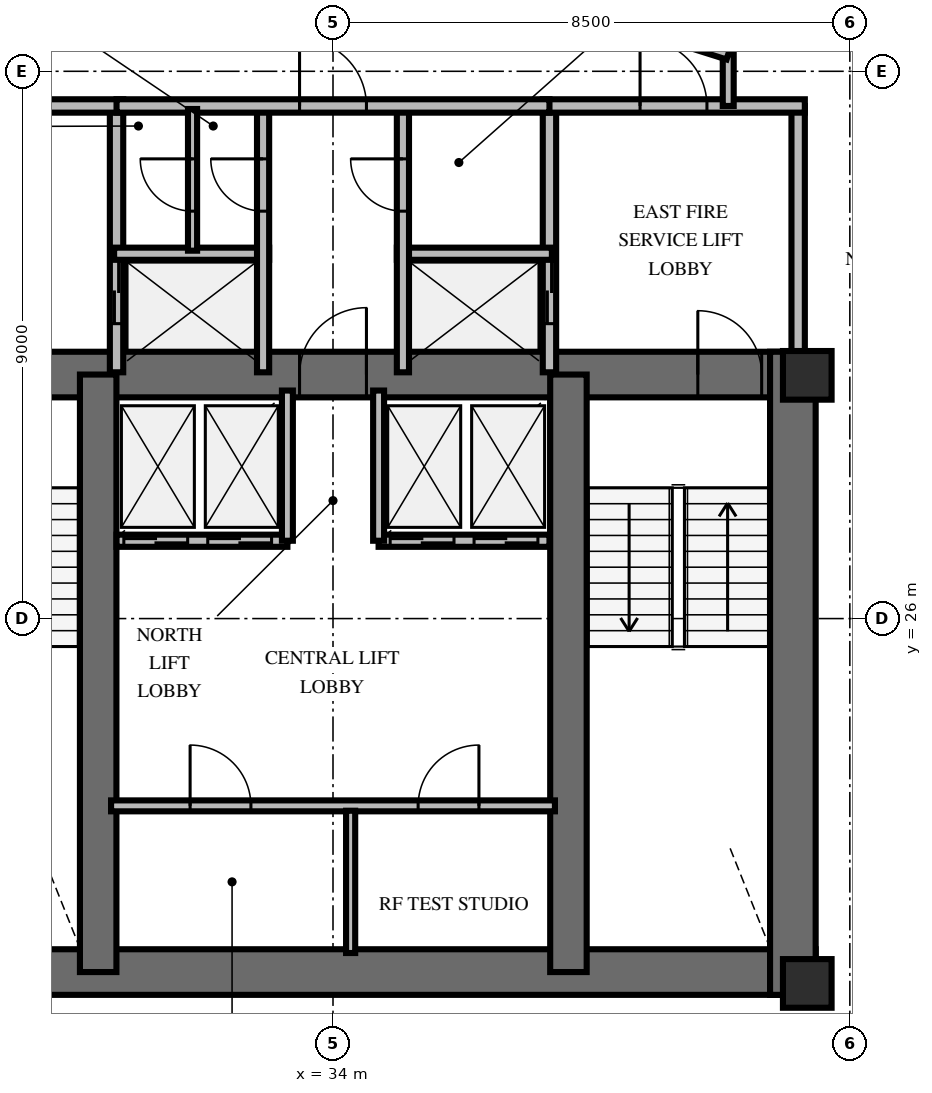
"""IFC4 building model, lengths in metres.
Left out: names, types, materials, properties, quantities, classifications, styles, units other than length and angle.
Written with IfcOpenShell. Run it as: python <this file> out.ifc"""

import sys

from ifc_helpers import new_model, si_unit, direction, frame, frame_2d, origin, origin_2d, place, context, subcontext, project, spatial, rectangle, extrude, element, fill, save


model = new_model("IFC4")
c1 = context("Model", 3, precision=1e-05, world=origin(), true_north=direction((0.0, 1.0)))
c2 = subcontext(c1, "Body", "Model", "MODEL_VIEW")
j1 = project(units=[si_unit("LENGTHUNIT", "METRE"), si_unit("PLANEANGLEUNIT", "RADIAN")], contexts=[c1])
p1 = place(None, origin())
s1 = spatial("IfcSite", under=j1, at=p1, CompositionType="ELEMENT")
p2 = place(p1, origin())
s2 = spatial("IfcBuilding", under=s1, at=p2, CompositionType="ELEMENT")
p3 = place(p2, frame((0.0, 0.0, 213.2)))
s3 = spatial("IfcBuildingStorey", under=s2, at=p3, CompositionType="ELEMENT", Elevation=213.2)
p4 = place(p3, frame((26.072, 20.187, 0.0), z_axis=(0.0, 0.0, 1.0), x_axis=(1.0, 0.0, 0.0)))
e1 = element("IfcWall", 1, at=p4, inside=s3, PredefinedType="SHEAR", context=c2, shape_type="SweptSolid", body=[
    extrude(rectangle(XDim=15.866, YDim=0.75, at=frame_2d((7.933, 0.0))), origin(), (0.0, 0.0, 1.0), 3.6),
])
p5 = place(p3, frame((26.072, 30.013, 0.0), z_axis=(0.0, 0.0, 1.0), x_axis=(1.0, 0.0, 0.0)))
e2 = element("IfcWall", 2, at=p5, inside=s3, PredefinedType="SHEAR", context=c2, shape_type="SweptSolid", body=[
    extrude(rectangle(XDim=15.866, YDim=0.75, at=frame_2d((7.933, 0.0))), origin(), (0.0, 0.0, 1.0), 3.6),
])
p6 = place(p5, frame((0.878, 0.0, 0.0)))
e3 = element("IfcOpeningElement", 3, at=p6, cuts=e2, PredefinedType="OPENING", context=c2, shape_type="SweptSolid", body=[
    extrude(rectangle(XDim=1.05, YDim=2.15, at=frame_2d((0.525, 1.075))), frame((0.0, 0.385, 0.0), z_axis=(0.0, -1.0, 0.0), x_axis=(1.0, 0.0, 0.0)), (0.0, 0.0, 1.0), 0.77),
])
p7 = place(p5, frame((13.928, 0.0, 0.0)))
e4 = element("IfcOpeningElement", 4, at=p7, cuts=e2, PredefinedType="OPENING", context=c2, shape_type="SweptSolid", body=[
    extrude(rectangle(XDim=1.05, YDim=2.15, at=frame_2d((0.525, 1.075))), frame((0.0, 0.385, 0.0), z_axis=(0.0, -1.0, 0.0), x_axis=(1.0, 0.0, 0.0)), (0.0, 0.0, 1.0), 0.77),
])
p8 = place(p5, frame((7.378, 0.0, 0.0)))
e5 = element("IfcOpeningElement", 5, at=p8, cuts=e2, PredefinedType="OPENING", context=c2, shape_type="SweptSolid", body=[
    extrude(rectangle(XDim=1.1, YDim=2.15, at=frame_2d((0.55, 1.075))), frame((0.0, 0.385, 0.0), z_axis=(0.0, -1.0, 0.0), x_axis=(1.0, 0.0, 0.0)), (0.0, 0.0, 1.0), 0.77),
])
p9 = place(p3, frame((41.563, 19.812, 0.0), z_axis=(0.0, 0.0, 1.0), x_axis=(0.0, 1.0, 0.0)))
e6 = element("IfcWall", 6, at=p9, inside=s3, PredefinedType="SHEAR", context=c2, shape_type="SweptSolid", body=[
    extrude(rectangle(XDim=10.576, YDim=0.75, at=frame_2d((5.288, 0.0))), origin(), (0.0, 0.0, 1.0), 3.6),
])
for number, where, z_axis, x_axis in (
    (7, (30.138, 20.187, 0.0), (0.0, 0.0, 1.0), (0.0, 1.0, 0.0)),
    (8, (37.872, 20.187, 0.0), (0.0, 0.0, 1.0), (0.0, 1.0, 0.0)),
):
    element("IfcWall", number, at=place(p3, frame(where, z_axis=z_axis, x_axis=x_axis)), inside=s3, PredefinedType="SHEAR", context=c2, shape_type="SweptSolid", body=[
        extrude(rectangle(XDim=9.826, YDim=0.6, at=frame_2d((4.913, 0.0))), origin(), (0.0, 0.0, 1.0), 3.6),
    ])
for number, where, z_axis, x_axis in (
    (9, (41.8, 20.0, 0.0), (0.0, 0.0, 1.0), (1.0, 0.0, 0.0)),
    (10, (41.8, 30.0, 0.0), (0.0, 0.0, 1.0), (1.0, 0.0, 0.0)),
):
    element("IfcColumn", number, at=place(p3, frame(where, z_axis=z_axis, x_axis=x_axis)), inside=s3, PredefinedType="PILASTER", context=c2, shape_type="SweptSolid", body=[
        extrude(rectangle(XDim=0.8, YDim=0.8, at=origin_2d()), origin(), (0.0, 0.0, 1.0), 3.6),
    ])
p10 = place(p3, frame((30.44, 30.05, 0.0), z_axis=(0.0, 0.0, 1.0), x_axis=(0.0, 1.0, 0.0)))
e11 = element("IfcWall", 11, at=p10, inside=s3, PredefinedType="SOLIDWALL", context=c2, shape_type="SweptSolid", body=[
    extrude(rectangle(XDim=4.38, YDim=0.22, at=frame_2d((2.19, 0.0))), origin(), (0.0, 0.0, 1.0), 2.46),
])
p11 = place(p10, frame((0.8, 0.0, 0.0)))
e12 = element("IfcOpeningElement", 12, at=p11, cuts=e11, PredefinedType="OPENING", context=c2, shape_type="SweptSolid", body=[
    extrude(rectangle(XDim=1.05, YDim=2.1, at=frame_2d((0.525, 1.05))), frame((0.0, 0.12, 0.0), z_axis=(0.0, -1.0, 0.0), x_axis=(1.0, 0.0, 0.0)), (0.0, 0.0, 1.0), 0.24),
])
p12 = place(p3, frame((26.24, 34.43, 0.0), z_axis=(0.0, 0.0, 1.0), x_axis=(1.0, 0.0, 0.0)))
e13 = element("IfcWall", 13, at=p12, inside=s3, PredefinedType="SOLIDWALL", context=c2, shape_type="SweptSolid", body=[
    extrude(rectangle(XDim=4.31, YDim=0.22, at=frame_2d((2.155, 0.0))), origin(), (0.0, 0.0, 1.0), 2.46),
])
p13 = place(p12, frame((1.6, 0.0, 0.0)))
e14 = element("IfcOpeningElement", 14, at=p13, cuts=e13, PredefinedType="OPENING", context=c2, shape_type="SweptSolid", body=[
    extrude(rectangle(XDim=1.1, YDim=2.15, at=frame_2d((0.55, 1.075))), frame((0.0, 0.12, 0.0), z_axis=(0.0, -1.0, 0.0), x_axis=(1.0, 0.0, 0.0)), (0.0, 0.0, 1.0), 0.24),
])
p14 = place(p3, frame((30.4, 32.0, 0.0), z_axis=(0.0, 0.0, 1.0), x_axis=(1.0, 0.0, 0.0)))
e15 = element("IfcWall", 15, at=p14, inside=s3, PredefinedType="SOLIDWALL", context=c2, shape_type="SweptSolid", body=[
    extrude(rectangle(XDim=2.55, YDim=0.2, at=frame_2d((1.275, 0.0))), origin(), (0.0, 0.0, 1.0), 2.46),
])
p15 = place(p3, frame((32.85, 30.05, 0.0), z_axis=(0.0, 0.0, 1.0), x_axis=(0.0, 1.0, 0.0)))
e16 = element("IfcWall", 16, at=p15, inside=s3, PredefinedType="SOLIDWALL", context=c2, shape_type="SweptSolid", body=[
    extrude(rectangle(XDim=4.38, YDim=0.2, at=frame_2d((2.19, 0.0))), origin(), (0.0, 0.0, 1.0), 2.46),
])
p16 = place(p15, frame((2.65, 0.0, 0.0)))
e17 = element("IfcOpeningElement", 17, at=p16, cuts=e16, PredefinedType="OPENING", context=c2, shape_type="SweptSolid", body=[
    extrude(rectangle(XDim=0.86, YDim=2.05, at=frame_2d((0.43, 1.025))), frame((0.0, 0.11, 0.0), z_axis=(0.0, -1.0, 0.0), x_axis=(1.0, 0.0, 0.0)), (0.0, 0.0, 1.0), 0.22),
])
p17 = place(p3, frame((37.56, 30.05, 0.0), z_axis=(0.0, 0.0, 1.0), x_axis=(0.0, 1.0, 0.0)))
e18 = element("IfcWall", 18, at=p17, inside=s3, PredefinedType="SOLIDWALL", context=c2, shape_type="SweptSolid", body=[
    extrude(rectangle(XDim=4.38, YDim=0.22, at=frame_2d((2.19, 0.0))), origin(), (0.0, 0.0, 1.0), 2.46),
])
p18 = place(p17, frame((0.8, 0.0, 0.0)))
e19 = element("IfcOpeningElement", 19, at=p18, cuts=e18, PredefinedType="OPENING", context=c2, shape_type="SweptSolid", body=[
    extrude(rectangle(XDim=1.05, YDim=2.1, at=frame_2d((0.525, 1.05))), frame((0.0, 0.12, 0.0), z_axis=(0.0, -1.0, 0.0), x_axis=(1.0, 0.0, 0.0)), (0.0, 0.0, 1.0), 0.24),
])
p19 = place(p3, frame((41.65, 30.05, 0.0), z_axis=(0.0, 0.0, 1.0), x_axis=(0.0, 1.0, 0.0)))
e20 = element("IfcWall", 20, at=p19, inside=s3, PredefinedType="SOLIDWALL", context=c2, shape_type="SweptSolid", body=[
    extrude(rectangle(XDim=4.38, YDim=0.22, at=frame_2d((2.19, 0.0))), origin(), (0.0, 0.0, 1.0), 2.46),
])
p20 = place(p3, frame((37.45, 34.43, 0.0), z_axis=(0.0, 0.0, 1.0), x_axis=(1.0, 0.0, 0.0)))
e21 = element("IfcWall", 21, at=p20, inside=s3, PredefinedType="SOLIDWALL", context=c2, shape_type="SweptSolid", body=[
    extrude(rectangle(XDim=4.31, YDim=0.22, at=frame_2d((2.155, 0.0))), origin(), (0.0, 0.0, 1.0), 2.46),
])
p21 = place(p20, frame((1.6, 0.0, 0.0)))
e22 = element("IfcOpeningElement", 22, at=p21, cuts=e21, PredefinedType="OPENING", context=c2, shape_type="SweptSolid", body=[
    extrude(rectangle(XDim=1.1, YDim=2.15, at=frame_2d((0.55, 1.075))), frame((0.0, 0.12, 0.0), z_axis=(0.0, -1.0, 0.0), x_axis=(1.0, 0.0, 0.0)), (0.0, 0.0, 1.0), 0.24),
])
p22 = place(p3, frame((35.05, 32.0, 0.0), z_axis=(0.0, 0.0, 1.0), x_axis=(1.0, 0.0, 0.0)))
e23 = element("IfcWall", 23, at=p22, inside=s3, PredefinedType="SOLIDWALL", context=c2, shape_type="SweptSolid", body=[
    extrude(rectangle(XDim=2.55, YDim=0.2, at=frame_2d((1.275, 0.0))), origin(), (0.0, 0.0, 1.0), 2.46),
])
p23 = place(p3, frame((35.15, 30.05, 0.0), z_axis=(0.0, 0.0, 1.0), x_axis=(0.0, 1.0, 0.0)))
e24 = element("IfcWall", 24, at=p23, inside=s3, PredefinedType="SOLIDWALL", context=c2, shape_type="SweptSolid", body=[
    extrude(rectangle(XDim=4.38, YDim=0.2, at=frame_2d((2.19, 0.0))), origin(), (0.0, 0.0, 1.0), 2.46),
])
p24 = place(p23, frame((2.65, 0.0, 0.0)))
e25 = element("IfcOpeningElement", 25, at=p24, cuts=e24, PredefinedType="OPENING", context=c2, shape_type="SweptSolid", body=[
    extrude(rectangle(XDim=0.86, YDim=2.05, at=frame_2d((0.43, 1.025))), frame((0.0, 0.11, 0.0), z_axis=(0.0, -1.0, 0.0), x_axis=(1.0, 0.0, 0.0)), (0.0, 0.0, 1.0), 0.22),
])
p25 = place(p3, frame((30.44, 34.43, 0.0), z_axis=(0.0, 0.0, 1.0), x_axis=(1.0, 0.0, 0.0)))
e26 = element("IfcWall", 26, at=p25, inside=s3, PredefinedType="SOLIDWALL", context=c2, shape_type="SweptSolid", body=[
    extrude(rectangle(XDim=7.12, YDim=0.22, at=frame_2d((3.56, 0.0))), origin(), (0.0, 0.0, 1.0), 2.46),
])
p26 = place(p25, frame((3.01, 0.0, 0.0)))
e27 = element("IfcOpeningElement", 27, at=p26, cuts=e26, PredefinedType="OPENING", context=c2, shape_type="SweptSolid", body=[
    extrude(rectangle(XDim=1.1, YDim=2.15, at=frame_2d((0.55, 1.075))), frame((0.0, 0.12, 0.0), z_axis=(0.0, -1.0, 0.0), x_axis=(1.0, 0.0, 0.0)), (0.0, 0.0, 1.0), 0.24),
])
p27 = place(p3, frame((31.69, 32.05, 0.0), z_axis=(0.0, 0.0, 1.0), x_axis=(0.0, 1.0, 0.0)))
e28 = element("IfcWall", 28, at=p27, inside=s3, PredefinedType="PARTITIONING", context=c2, shape_type="SweptSolid", body=[
    extrude(rectangle(XDim=2.33, YDim=0.15, at=frame_2d((1.165, 0.0))), origin(), (0.0, 0.0, 1.0), 2.46),
])
p28 = place(p27, frame((0.65, 0.0, 0.0)))
e29 = element("IfcOpeningElement", 29, at=p28, cuts=e28, PredefinedType="OPENING", context=c2, shape_type="SweptSolid", body=[
    extrude(rectangle(XDim=0.86, YDim=2.05, at=frame_2d((0.43, 1.025))), frame((0.0, 0.085, 0.0), z_axis=(0.0, -1.0, 0.0), x_axis=(1.0, 0.0, 0.0)), (0.0, 0.0, 1.0), 0.17),
])
p29 = place(p3, frame((30.35, 22.92, 0.0), z_axis=(0.0, 0.0, 1.0), x_axis=(1.0, 0.0, 0.0)))
e30 = element("IfcWall", 30, at=p29, inside=s3, PredefinedType="PARTITIONING", context=c2, shape_type="SweptSolid", body=[
    extrude(rectangle(XDim=7.3, YDim=0.18, at=frame_2d((3.65, 0.0))), origin(), (0.0, 0.0, 1.0), 2.46),
])
p30 = place(p29, frame((1.3, 0.0, 0.0)))
e31 = element("IfcOpeningElement", 31, at=p30, cuts=e30, PredefinedType="OPENING", context=c2, shape_type="SweptSolid", body=[
    extrude(rectangle(XDim=1.0, YDim=2.15, at=frame_2d((0.5, 1.075))), frame((0.0, 0.1, 0.0), z_axis=(0.0, -1.0, 0.0), x_axis=(1.0, 0.0, 0.0)), (0.0, 0.0, 1.0), 0.2),
])
p31 = place(p29, frame((5.05, 0.0, 0.0)))
e32 = element("IfcOpeningElement", 32, at=p31, cuts=e30, PredefinedType="OPENING", context=c2, shape_type="SweptSolid", body=[
    extrude(rectangle(XDim=1.0, YDim=2.15, at=frame_2d((0.5, 1.075))), frame((0.0, 0.1, 0.0), z_axis=(0.0, -1.0, 0.0), x_axis=(1.0, 0.0, 0.0)), (0.0, 0.0, 1.0), 0.2),
])
p32 = place(p3, frame((34.29, 20.5, 0.0), z_axis=(0.0, 0.0, 1.0), x_axis=(0.0, 1.0, 0.0)))
e33 = element("IfcWall", 33, at=p32, inside=s3, PredefinedType="PARTITIONING", context=c2, shape_type="SweptSolid", body=[
    extrude(rectangle(XDim=2.34, YDim=0.15, at=frame_2d((1.17, 0.0))), origin(), (0.0, 0.0, 1.0), 2.46),
])
p33 = place(p3, frame((30.44, 27.28, 0.0), z_axis=(0.0, 0.0, 1.0), x_axis=(1.0, 0.0, 0.0)))
e34 = element("IfcWall", 34, at=p33, inside=s3, PredefinedType="SOLIDWALL", context=c2, shape_type="SweptSolid", body=[
    extrude(rectangle(XDim=2.81, YDim=0.2, at=frame_2d((1.405, 0.0))), origin(), (0.0, 0.0, 1.0), 2.46),
])
p34 = place(p33, frame((0.12, 0.0, 0.0)))
e35 = element("IfcOpeningElement", 35, at=p34, cuts=e34, PredefinedType="OPENING", context=c2, shape_type="SweptSolid", body=[
    extrude(rectangle(XDim=1.05, YDim=2.1, at=frame_2d((0.525, 1.05))), frame((0.0, 0.11, 0.0), z_axis=(0.0, -1.0, 0.0), x_axis=(1.0, 0.0, 0.0)), (0.0, 0.0, 1.0), 0.22),
])
p35 = place(p33, frame((1.5, 0.0, 0.0)))
e36 = element("IfcOpeningElement", 36, at=p35, cuts=e34, PredefinedType="OPENING", context=c2, shape_type="SweptSolid", body=[
    extrude(rectangle(XDim=1.05, YDim=2.1, at=frame_2d((0.525, 1.05))), frame((0.0, 0.11, 0.0), z_axis=(0.0, -1.0, 0.0), x_axis=(1.0, 0.0, 0.0)), (0.0, 0.0, 1.0), 0.22),
])
p36 = place(p3, frame((33.25, 27.28, 0.0), z_axis=(0.0, 0.0, 1.0), x_axis=(0.0, 1.0, 0.0)))
e37 = element("IfcWall", 37, at=p36, inside=s3, PredefinedType="SOLIDWALL", context=c2, shape_type="SweptSolid", body=[
    extrude(rectangle(XDim=2.47, YDim=0.18, at=frame_2d((1.235, 0.0))), origin(), (0.0, 0.0, 1.0), 2.46),
])
p37 = place(p3, frame((34.75, 27.28, 0.0), z_axis=(0.0, 0.0, 1.0), x_axis=(1.0, 0.0, 0.0)))
e38 = element("IfcWall", 38, at=p37, inside=s3, PredefinedType="SOLIDWALL", context=c2, shape_type="SweptSolid", body=[
    extrude(rectangle(XDim=2.81, YDim=0.2, at=frame_2d((1.405, 0.0))), origin(), (0.0, 0.0, 1.0), 2.46),
])
p38 = place(p37, frame((0.19, 0.0, 0.0)))
e39 = element("IfcOpeningElement", 39, at=p38, cuts=e38, PredefinedType="OPENING", context=c2, shape_type="SweptSolid", body=[
    extrude(rectangle(XDim=1.05, YDim=2.1, at=frame_2d((0.525, 1.05))), frame((0.0, 0.11, 0.0), z_axis=(0.0, -1.0, 0.0), x_axis=(1.0, 0.0, 0.0)), (0.0, 0.0, 1.0), 0.22),
])
p39 = place(p37, frame((1.57, 0.0, 0.0)))
e40 = element("IfcOpeningElement", 40, at=p39, cuts=e38, PredefinedType="OPENING", context=c2, shape_type="SweptSolid", body=[
    extrude(rectangle(XDim=1.05, YDim=2.1, at=frame_2d((0.525, 1.05))), frame((0.0, 0.11, 0.0), z_axis=(0.0, -1.0, 0.0), x_axis=(1.0, 0.0, 0.0)), (0.0, 0.0, 1.0), 0.22),
])
p40 = place(p3, frame((34.75, 27.28, 0.0), z_axis=(0.0, 0.0, 1.0), x_axis=(0.0, 1.0, 0.0)))
e41 = element("IfcWall", 41, at=p40, inside=s3, PredefinedType="SOLIDWALL", context=c2, shape_type="SweptSolid", body=[
    extrude(rectangle(XDim=2.47, YDim=0.18, at=frame_2d((1.235, 0.0))), origin(), (0.0, 0.0, 1.0), 2.46),
])
p41 = place(p3, frame((40.5, 35.28, 0.0), z_axis=(0.0, 0.0, 1.0), x_axis=(0.0, -1.0, 0.0)))
e42 = element("IfcWall", 42, at=p41, inside=s3, PredefinedType="PARTITIONING", context=c2, shape_type="SweptSolid", body=[
    extrude(rectangle(XDim=0.85, YDim=0.18, at=frame_2d((0.425, 0.0))), origin(), (0.0, 0.0, 1.0), 2.46),
])
p42 = place(p3, frame((27.5, 35.28, 0.0), z_axis=(0.0, 0.0, 1.0), x_axis=(0.953691418528, 0.300786765376, 0.0)))
e43 = element("IfcWall", 43, at=p42, inside=s3, PredefinedType="PARTITIONING", context=c2, shape_type="SweptSolid", body=[
    extrude(rectangle(XDim=6.816, YDim=0.18, at=frame_2d((3.408, 0.0))), origin(), (0.0, 0.0, 1.0), 2.46),
])
p43 = place(p42, frame((2.858, 0.0, 0.0)))
e44 = element("IfcOpeningElement", 44, at=p43, cuts=e43, PredefinedType="OPENING", context=c2, shape_type="SweptSolid", body=[
    extrude(rectangle(XDim=1.1, YDim=2.15, at=frame_2d((0.55, 1.075))), frame((0.0, 0.1, 0.0), z_axis=(0.0, -1.0, 0.0), x_axis=(1.0, 0.0, 0.0)), (0.0, 0.0, 1.0), 0.2),
])
p44 = place(p3, frame((34.0, 37.33, 0.0), z_axis=(0.0, 0.0, 1.0), x_axis=(0.953691418528, -0.300786765376, 0.0)))
e45 = element("IfcWall", 45, at=p44, inside=s3, PredefinedType="PARTITIONING", context=c2, shape_type="SweptSolid", body=[
    extrude(rectangle(XDim=6.816, YDim=0.18, at=frame_2d((3.408, 0.0))), origin(), (0.0, 0.0, 1.0), 2.46),
])
p45 = place(p44, frame((2.858, 0.0, 0.0)))
e46 = element("IfcOpeningElement", 46, at=p45, cuts=e45, PredefinedType="OPENING", context=c2, shape_type="SweptSolid", body=[
    extrude(rectangle(XDim=1.1, YDim=2.15, at=frame_2d((0.55, 1.075))), frame((0.0, 0.1, 0.0), z_axis=(0.0, -1.0, 0.0), x_axis=(1.0, 0.0, 0.0)), (0.0, 0.0, 1.0), 0.2),
])
p46 = place(p3, frame((43.449, 35.03, 0.0), z_axis=(0.0, 0.0, 1.0), x_axis=(-0.805924234129, 0.592018689606, 0.0)))
e47 = element("IfcWall", 47, at=p46, inside=s3, PredefinedType="PARTITIONING", context=c2, shape_type="SweptSolid", body=[
    extrude(rectangle(XDim=4.539, YDim=0.18, at=frame_2d((2.27, 0.0))), origin(), (0.0, 0.0, 1.0), 2.46),
])
p47 = place(p7, origin())
e48 = element("IfcDoor", 48, at=p47, inside=s3, OperationType="SINGLE_SWING_LEFT", PredefinedType="DOOR", context=c2, shape_type="SweptSolid", body=[
    extrude(rectangle(XDim=1.05, YDim=2.15, at=frame_2d((0.525, 1.075))), frame((0.0, 0.025, 0.0), z_axis=(0.0, -1.0, 0.0), x_axis=(1.0, 0.0, 0.0)), (0.0, 0.0, 1.0), 0.05),
])
fill(e4, e48)
p48 = place(p8, origin())
e49 = element("IfcDoor", 49, at=p48, inside=s3, OperationType="SINGLE_SWING_RIGHT", PredefinedType="DOOR", context=c2, shape_type="SweptSolid", body=[
    extrude(rectangle(XDim=1.1, YDim=2.15, at=frame_2d((0.55, 1.075))), frame((0.0, 0.025, 0.0), z_axis=(0.0, -1.0, 0.0), x_axis=(1.0, 0.0, 0.0)), (0.0, 0.0, 1.0), 0.05),
])
fill(e5, e49)
p49 = place(p11, origin())
e50 = element("IfcDoor", 50, at=p49, inside=s3, OperationType="DOUBLE_DOOR_SLIDING", PredefinedType="USERDEFINED", context=c2, shape_type="SweptSolid", body=[
    extrude(rectangle(XDim=1.05, YDim=2.1, at=frame_2d((0.525, 1.05))), frame((0.0, 0.025, 0.0), z_axis=(0.0, -1.0, 0.0), x_axis=(1.0, 0.0, 0.0)), (0.0, 0.0, 1.0), 0.05),
])
fill(e12, e50)
p50 = place(p16, origin())
e51 = element("IfcDoor", 51, at=p50, inside=s3, OperationType="SINGLE_SWING_RIGHT", PredefinedType="TRAPDOOR", context=c2, shape_type="SweptSolid", body=[
    extrude(rectangle(XDim=0.86, YDim=2.05, at=frame_2d((0.43, 1.025))), frame((0.0, 0.025, 0.0), z_axis=(0.0, -1.0, 0.0), x_axis=(1.0, 0.0, 0.0)), (0.0, 0.0, 1.0), 0.05),
])
fill(e17, e51)
p51 = place(p21, origin())
e52 = element("IfcDoor", 52, at=p51, inside=s3, OperationType="SINGLE_SWING_LEFT", PredefinedType="DOOR", context=c2, shape_type="SweptSolid", body=[
    extrude(rectangle(XDim=1.1, YDim=2.15, at=frame_2d((0.55, 1.075))), frame((0.0, 0.025, 0.0), z_axis=(0.0, -1.0, 0.0), x_axis=(1.0, 0.0, 0.0)), (0.0, 0.0, 1.0), 0.05),
])
fill(e22, e52)
p52 = place(p18, origin())
e53 = element("IfcDoor", 53, at=p52, inside=s3, OperationType="DOUBLE_DOOR_SLIDING", PredefinedType="USERDEFINED", context=c2, shape_type="SweptSolid", body=[
    extrude(rectangle(XDim=1.05, YDim=2.1, at=frame_2d((0.525, 1.05))), frame((0.0, 0.025, 0.0), z_axis=(0.0, -1.0, 0.0), x_axis=(1.0, 0.0, 0.0)), (0.0, 0.0, 1.0), 0.05),
])
fill(e19, e53)
p53 = place(p24, origin())
e54 = element("IfcDoor", 54, at=p53, inside=s3, OperationType="SINGLE_SWING_RIGHT", PredefinedType="TRAPDOOR", context=c2, shape_type="SweptSolid", body=[
    extrude(rectangle(XDim=0.86, YDim=2.05, at=frame_2d((0.43, 1.025))), frame((0.0, 0.025, 0.0), z_axis=(0.0, -1.0, 0.0), x_axis=(1.0, 0.0, 0.0)), (0.0, 0.0, 1.0), 0.05),
])
fill(e25, e54)
p54 = place(p26, origin())
e55 = element("IfcDoor", 55, at=p54, inside=s3, OperationType="SINGLE_SWING_LEFT", PredefinedType="DOOR", context=c2, shape_type="SweptSolid", body=[
    extrude(rectangle(XDim=1.1, YDim=2.15, at=frame_2d((0.55, 1.075))), frame((0.0, 0.025, 0.0), z_axis=(0.0, -1.0, 0.0), x_axis=(1.0, 0.0, 0.0)), (0.0, 0.0, 1.0), 0.05),
])
fill(e27, e55)
p55 = place(p28, origin())
e56 = element("IfcDoor", 56, at=p55, inside=s3, OperationType="SINGLE_SWING_RIGHT", PredefinedType="TRAPDOOR", context=c2, shape_type="SweptSolid", body=[
    extrude(rectangle(XDim=0.86, YDim=2.05, at=frame_2d((0.43, 1.025))), frame((0.0, 0.025, 0.0), z_axis=(0.0, -1.0, 0.0), x_axis=(1.0, 0.0, 0.0)), (0.0, 0.0, 1.0), 0.05),
])
fill(e29, e56)
p56 = place(p30, origin())
e57 = element("IfcDoor", 57, at=p56, inside=s3, OperationType="SINGLE_SWING_LEFT", PredefinedType="DOOR", context=c2, shape_type="SweptSolid", body=[
    extrude(rectangle(XDim=1.0, YDim=2.15, at=frame_2d((0.5, 1.075))), frame((0.0, 0.025, 0.0), z_axis=(0.0, -1.0, 0.0), x_axis=(1.0, 0.0, 0.0)), (0.0, 0.0, 1.0), 0.05),
])
fill(e31, e57)
p57 = place(p31, origin())
e58 = element("IfcDoor", 58, at=p57, inside=s3, OperationType="SINGLE_SWING_RIGHT", PredefinedType="DOOR", context=c2, shape_type="SweptSolid", body=[
    extrude(rectangle(XDim=1.0, YDim=2.15, at=frame_2d((0.5, 1.075))), frame((0.0, 0.025, 0.0), z_axis=(0.0, -1.0, 0.0), x_axis=(1.0, 0.0, 0.0)), (0.0, 0.0, 1.0), 0.05),
])
fill(e32, e58)
p58 = place(p34, origin())
e59 = element("IfcDoor", 59, at=p58, inside=s3, OperationType="DOUBLE_DOOR_SLIDING", PredefinedType="USERDEFINED", context=c2, shape_type="SweptSolid", body=[
    extrude(rectangle(XDim=1.05, YDim=2.1, at=frame_2d((0.525, 1.05))), frame((0.0, 0.025, 0.0), z_axis=(0.0, -1.0, 0.0), x_axis=(1.0, 0.0, 0.0)), (0.0, 0.0, 1.0), 0.05),
])
fill(e35, e59)
p59 = place(p35, origin())
e60 = element("IfcDoor", 60, at=p59, inside=s3, OperationType="DOUBLE_DOOR_SLIDING", PredefinedType="USERDEFINED", context=c2, shape_type="SweptSolid", body=[
    extrude(rectangle(XDim=1.05, YDim=2.1, at=frame_2d((0.525, 1.05))), frame((0.0, 0.025, 0.0), z_axis=(0.0, -1.0, 0.0), x_axis=(1.0, 0.0, 0.0)), (0.0, 0.0, 1.0), 0.05),
])
fill(e36, e60)
p60 = place(p38, origin())
e61 = element("IfcDoor", 61, at=p60, inside=s3, OperationType="DOUBLE_DOOR_SLIDING", PredefinedType="USERDEFINED", context=c2, shape_type="SweptSolid", body=[
    extrude(rectangle(XDim=1.05, YDim=2.1, at=frame_2d((0.525, 1.05))), frame((0.0, 0.025, 0.0), z_axis=(0.0, -1.0, 0.0), x_axis=(1.0, 0.0, 0.0)), (0.0, 0.0, 1.0), 0.05),
])
fill(e39, e61)
p61 = place(p39, origin())
e62 = element("IfcDoor", 62, at=p61, inside=s3, OperationType="DOUBLE_DOOR_SLIDING", PredefinedType="USERDEFINED", context=c2, shape_type="SweptSolid", body=[
    extrude(rectangle(XDim=1.05, YDim=2.1, at=frame_2d((0.525, 1.05))), frame((0.0, 0.025, 0.0), z_axis=(0.0, -1.0, 0.0), x_axis=(1.0, 0.0, 0.0)), (0.0, 0.0, 1.0), 0.05),
])
fill(e40, e62)
save(model, sys.argv[1])
